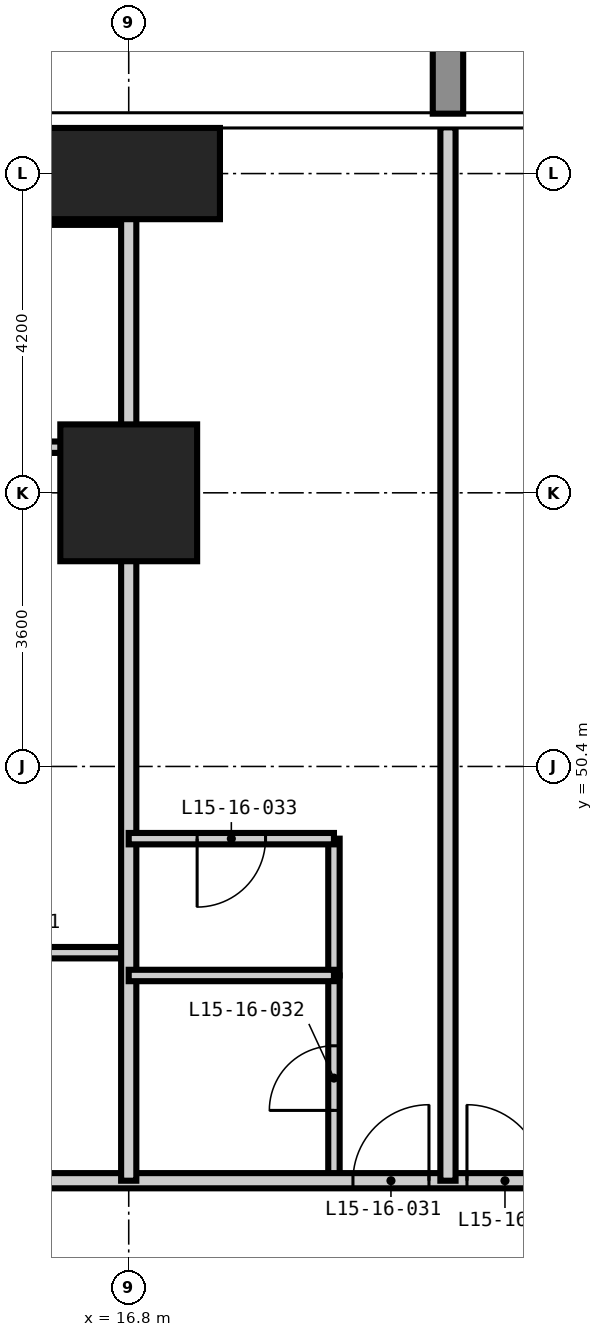
"""IFC4 building model, lengths in metres.
Left out: names, types, materials, properties, quantities, classifications, styles, units other than length and angle.
Written with IfcOpenShell. Run it as: python <this file> out.ifc"""

import sys

from ifc_helpers import new_model, si_unit, direction, frame, frame_2d, origin, origin_2d, place, context, subcontext, project, spatial, rectangle, extrude, element, fill, save


model = new_model("IFC4")
c1 = context("Model", 3, precision=1e-05, world=origin(), true_north=direction((0.0, 1.0)))
c2 = subcontext(c1, "Body", "Model", "MODEL_VIEW")
j1 = project(units=[si_unit("LENGTHUNIT", "METRE"), si_unit("PLANEANGLEUNIT", "RADIAN")], contexts=[c1])
p1 = place(None, origin())
s1 = spatial("IfcSite", under=j1, at=p1, CompositionType="ELEMENT")
p2 = place(p1, origin())
s2 = spatial("IfcBuilding", under=s1, at=p2, CompositionType="ELEMENT")
p3 = place(p2, frame((0.0, 0.0, 63.0)))
s3 = spatial("IfcBuildingStorey", under=s2, at=p3, CompositionType="ELEMENT", Elevation=63.0)
p4 = place(p3, frame((16.8, 54.0, -0.35), z_axis=(0.0, 0.0, 1.0), x_axis=(1.0, 0.0, 0.0)))
e1 = element("IfcColumn", 1, at=p4, inside=s3, PredefinedType="COLUMN", context=c2, shape_type="SweptSolid", body=[
    extrude(rectangle(XDim=1.8, YDim=1.8, at=origin_2d()), origin(), (0.0, 0.0, 1.0), 3.6),
])
p5 = place(p3, frame((16.8, 58.2, -0.35), z_axis=(0.0, 0.0, 1.0), x_axis=(1.0, 0.0, 0.0)))
e2 = element("IfcColumn", 2, at=p5, inside=s3, PredefinedType="COLUMN", context=c2, shape_type="SweptSolid", body=[
    extrude(rectangle(XDim=2.4, YDim=1.2, at=origin_2d()), origin(), (0.0, 0.0, 1.0), 3.6),
])
p6 = place(p3, frame((19.5, 44.95, 0.0), z_axis=(0.0, 0.0, 1.0), x_axis=(0.0, 1.0, 0.0)))
e3 = element("IfcWall", 3, at=p6, inside=s3, PredefinedType="PARTITIONING", context=c2, shape_type="SweptSolid", body=[
    extrude(rectangle(XDim=2.7, YDim=0.15, at=frame_2d((1.35, 0.0))), origin(), (0.0, 0.0, 1.0), 3.25),
])
p7 = place(p6, frame((0.925, 0.0, 0.0)))
e4 = element("IfcOpeningElement", 4, at=p7, cuts=e3, PredefinedType="OPENING", context=c2, shape_type="SweptSolid", body=[
    extrude(rectangle(XDim=0.85, YDim=2.1, at=frame_2d((0.425, 1.05))), frame((0.0, 0.085, 0.0), z_axis=(0.0, -1.0, 0.0), x_axis=(1.0, 0.0, 0.0)), (0.0, 0.0, 1.0), 0.17),
])
p8 = place(p3, frame((13.25, 47.95, 0.0), z_axis=(0.0, 0.0, 1.0), x_axis=(1.0, 0.0, 0.0)))
e5 = element("IfcWall", 5, at=p8, inside=s3, PredefinedType="PARTITIONING", context=c2, shape_type="SweptSolid", body=[
    extrude(rectangle(XDim=3.55, YDim=0.15, at=frame_2d((1.775, 0.0))), origin(), (0.0, 0.0, 1.0), 3.25),
])
p9 = place(p8, frame((1.35, 0.0, 0.0)))
e6 = element("IfcOpeningElement", 6, at=p9, cuts=e5, PredefinedType="OPENING", context=c2, shape_type="SweptSolid", body=[
    extrude(rectangle(XDim=0.85, YDim=2.1, at=frame_2d((0.425, 1.05))), frame((0.0, 0.085, 0.0), z_axis=(0.0, -1.0, 0.0), x_axis=(1.0, 0.0, 0.0)), (0.0, 0.0, 1.0), 0.17),
])
p10 = place(p3, frame((13.2, 57.6, 0.0), z_axis=(0.0, 0.0, 1.0), x_axis=(1.0, 0.0, 0.0)))
e7 = element("IfcWall", 7, at=p10, inside=s3, PredefinedType="PARTITIONING", context=c2, shape_type="SweptSolid", body=[
    extrude(rectangle(XDim=3.6, YDim=0.15, at=frame_2d((1.8, 0.0))), origin(), (0.0, 0.0, 1.0), 3.25),
])
p11 = place(p10, frame((1.375, 0.0, 0.0)))
e8 = element("IfcOpeningElement", 8, at=p11, cuts=e7, PredefinedType="OPENING", context=c2, shape_type="SweptSolid", body=[
    extrude(rectangle(XDim=0.85, YDim=2.1, at=frame_2d((0.425, 1.05))), frame((0.0, 0.085, 0.0), z_axis=(0.0, -1.0, 0.0), x_axis=(1.0, 0.0, 0.0)), (0.0, 0.0, 1.0), 0.17),
])
p12 = place(p3, frame((13.25, 44.95, 0.0), z_axis=(0.0, 0.0, 1.0), x_axis=(1.0, 0.0, 0.0)))
e9 = element("IfcWall", 9, at=p12, inside=s3, PredefinedType="PARTITIONING", context=c2, shape_type="SweptSolid", body=[
    extrude(rectangle(XDim=32.9, YDim=0.2, at=frame_2d((16.45, 0.0))), origin(), (0.0, 0.0, 1.0), 3.25),
])
p13 = place(p12, frame((6.5, 0.0, 0.0)))
e10 = element("IfcOpeningElement", 10, at=p13, cuts=e9, PredefinedType="OPENING", context=c2, shape_type="SweptSolid", body=[
    extrude(rectangle(XDim=1.0, YDim=2.2, at=frame_2d((0.5, 1.1))), frame((0.0, 0.11, 0.0), z_axis=(0.0, -1.0, 0.0), x_axis=(1.0, 0.0, 0.0)), (0.0, 0.0, 1.0), 0.22),
])
p14 = place(p12, frame((8.0, 0.0, 0.0)))
e11 = element("IfcOpeningElement", 11, at=p14, cuts=e9, PredefinedType="OPENING", context=c2, shape_type="SweptSolid", body=[
    extrude(rectangle(XDim=1.0, YDim=2.2, at=frame_2d((0.5, 1.1))), frame((0.0, 0.11, 0.0), z_axis=(0.0, -1.0, 0.0), x_axis=(1.0, 0.0, 0.0)), (0.0, 0.0, 1.0), 0.22),
])
p15 = place(p12, frame((14.9, 0.0, 0.0)))
e12 = element("IfcOpeningElement", 12, at=p15, cuts=e9, PredefinedType="OPENING", context=c2, shape_type="SweptSolid", body=[
    extrude(rectangle(XDim=1.0, YDim=2.2, at=frame_2d((0.5, 1.1))), frame((0.0, 0.11, 0.0), z_axis=(0.0, -1.0, 0.0), x_axis=(1.0, 0.0, 0.0)), (0.0, 0.0, 1.0), 0.22),
])
p16 = place(p12, frame((16.4, 0.0, 0.0)))
e13 = element("IfcOpeningElement", 13, at=p16, cuts=e9, PredefinedType="OPENING", context=c2, shape_type="SweptSolid", body=[
    extrude(rectangle(XDim=1.0, YDim=2.2, at=frame_2d((0.5, 1.1))), frame((0.0, 0.11, 0.0), z_axis=(0.0, -1.0, 0.0), x_axis=(1.0, 0.0, 0.0)), (0.0, 0.0, 1.0), 0.22),
])
p17 = place(p12, frame((23.3, 0.0, 0.0)))
e14 = element("IfcOpeningElement", 14, at=p17, cuts=e9, PredefinedType="OPENING", context=c2, shape_type="SweptSolid", body=[
    extrude(rectangle(XDim=1.0, YDim=2.2, at=frame_2d((0.5, 1.1))), frame((0.0, 0.11, 0.0), z_axis=(0.0, -1.0, 0.0), x_axis=(1.0, 0.0, 0.0)), (0.0, 0.0, 1.0), 0.22),
])
p18 = place(p12, frame((24.8, 0.0, 0.0)))
e15 = element("IfcOpeningElement", 15, at=p18, cuts=e9, PredefinedType="OPENING", context=c2, shape_type="SweptSolid", body=[
    extrude(rectangle(XDim=1.0, YDim=2.2, at=frame_2d((0.5, 1.1))), frame((0.0, 0.11, 0.0), z_axis=(0.0, -1.0, 0.0), x_axis=(1.0, 0.0, 0.0)), (0.0, 0.0, 1.0), 0.22),
])
for number, where, z_axis, x_axis in (
    (16, (16.8, 44.95, 0.0), (0.0, 0.0, 1.0), (0.0, 1.0, 0.0)),
    (17, (21.0, 44.95, 0.0), (0.0, 0.0, 1.0), (0.0, 1.0, 0.0)),
):
    element("IfcWall", number, at=place(p3, frame(where, z_axis=z_axis, x_axis=x_axis)), inside=s3, PredefinedType="PARTITIONING", context=c2, shape_type="SweptSolid", body=[
        extrude(rectangle(XDim=13.858, YDim=0.2, at=frame_2d((6.929, 0.0))), origin(), (0.0, 0.0, 1.0), 3.25),
    ])
p19 = place(p3, frame((19.5, 47.65, 0.0), z_axis=(0.0, 0.0, 1.0), x_axis=(0.0, 1.0, 0.0)))
e18 = element("IfcWall", 18, at=p19, inside=s3, PredefinedType="PARTITIONING", context=c2, shape_type="SweptSolid", body=[
    extrude(rectangle(XDim=1.8, YDim=0.15, at=frame_2d((0.9, 0.0))), origin(), (0.0, 0.0, 1.0), 3.25),
])
p20 = place(p3, frame((16.8, 47.65, 0.0), z_axis=(0.0, 0.0, 1.0), x_axis=(1.0, 0.0, 0.0)))
e19 = element("IfcWall", 19, at=p20, inside=s3, PredefinedType="PARTITIONING", context=c2, shape_type="SweptSolid", body=[
    extrude(rectangle(XDim=2.7, YDim=0.15, at=frame_2d((1.35, 0.0))), origin(), (0.0, 0.0, 1.0), 3.25),
])
p21 = place(p3, frame((16.8, 49.45, 0.0), z_axis=(0.0, 0.0, 1.0), x_axis=(1.0, 0.0, 0.0)))
e20 = element("IfcWall", 20, at=p21, inside=s3, PredefinedType="PARTITIONING", context=c2, shape_type="SweptSolid", body=[
    extrude(rectangle(XDim=2.7, YDim=0.15, at=frame_2d((1.35, 0.0))), origin(), (0.0, 0.0, 1.0), 3.25),
])
p22 = place(p21, frame((0.9, 0.0, 0.0)))
e21 = element("IfcOpeningElement", 21, at=p22, cuts=e20, PredefinedType="OPENING", context=c2, shape_type="SweptSolid", body=[
    extrude(rectangle(XDim=0.9, YDim=2.1, at=frame_2d((0.45, 1.05))), frame((0.0, 0.085, 0.0), z_axis=(0.0, -1.0, 0.0), x_axis=(1.0, 0.0, 0.0)), (0.0, 0.0, 1.0), 0.17),
])
p23 = place(p3, frame((-0.008, 54.6, 0.0), z_axis=(0.0, 0.0, 1.0), x_axis=(1.0, 0.0, 0.0)))
e22 = element("IfcWall", 22, at=p23, inside=s3, PredefinedType="PARTITIONING", context=c2, shape_type="SweptSolid", body=[
    extrude(rectangle(XDim=16.808, YDim=0.15, at=frame_2d((8.404, 0.0))), origin(), (0.0, 0.0, 1.0), 3.25),
])
p24 = place(p23, frame((4.958, 0.0, 0.0)))
e23 = element("IfcOpeningElement", 23, at=p24, cuts=e22, PredefinedType="OPENING", context=c2, shape_type="SweptSolid", body=[
    extrude(rectangle(XDim=0.9, YDim=2.1, at=frame_2d((0.45, 1.05))), frame((0.0, 0.085, 0.0), z_axis=(0.0, -1.0, 0.0), x_axis=(1.0, 0.0, 0.0)), (0.0, 0.0, 1.0), 0.17),
])
p25 = place(p13, origin())
e24 = element("IfcDoor", 24, at=p25, inside=s3, OperationType="SINGLE_SWING_RIGHT", PredefinedType="DOOR", context=c2, shape_type="SweptSolid", body=[
    extrude(rectangle(XDim=1.0, YDim=2.2, at=frame_2d((0.5, 1.1))), frame((0.0, 0.025, 0.0), z_axis=(0.0, -1.0, 0.0), x_axis=(1.0, 0.0, 0.0)), (0.0, 0.0, 1.0), 0.05),
])
fill(e10, e24)
p26 = place(p7, origin())
e25 = element("IfcDoor", 25, at=p26, inside=s3, OperationType="SINGLE_SWING_LEFT", PredefinedType="DOOR", context=c2, shape_type="SweptSolid", body=[
    extrude(rectangle(XDim=0.85, YDim=2.1, at=frame_2d((0.425, 1.05))), frame((0.0, 0.025, 0.0), z_axis=(0.0, -1.0, 0.0), x_axis=(1.0, 0.0, 0.0)), (0.0, 0.0, 1.0), 0.05),
])
fill(e4, e25)
p27 = place(p22, frame((0.9, 0.0, 0.0), z_axis=(0.0, 0.0, 1.0), x_axis=(-1.0, 0.0, 0.0)))
e26 = element("IfcDoor", 26, at=p27, inside=s3, OperationType="SINGLE_SWING_RIGHT", PredefinedType="DOOR", context=c2, shape_type="SweptSolid", body=[
    extrude(rectangle(XDim=0.9, YDim=2.1, at=frame_2d((0.45, 1.05))), frame((0.0, 0.025, 0.0), z_axis=(0.0, -1.0, 0.0), x_axis=(1.0, 0.0, 0.0)), (0.0, 0.0, 1.0), 0.05),
])
fill(e21, e26)
p28 = place(p14, origin())
e27 = element("IfcDoor", 27, at=p28, inside=s3, OperationType="SINGLE_SWING_LEFT", PredefinedType="DOOR", context=c2, shape_type="SweptSolid", body=[
    extrude(rectangle(XDim=1.0, YDim=2.2, at=frame_2d((0.5, 1.1))), frame((0.0, 0.025, 0.0), z_axis=(0.0, -1.0, 0.0), x_axis=(1.0, 0.0, 0.0)), (0.0, 0.0, 1.0), 0.05),
])
fill(e11, e27)
save(model, sys.argv[1])
